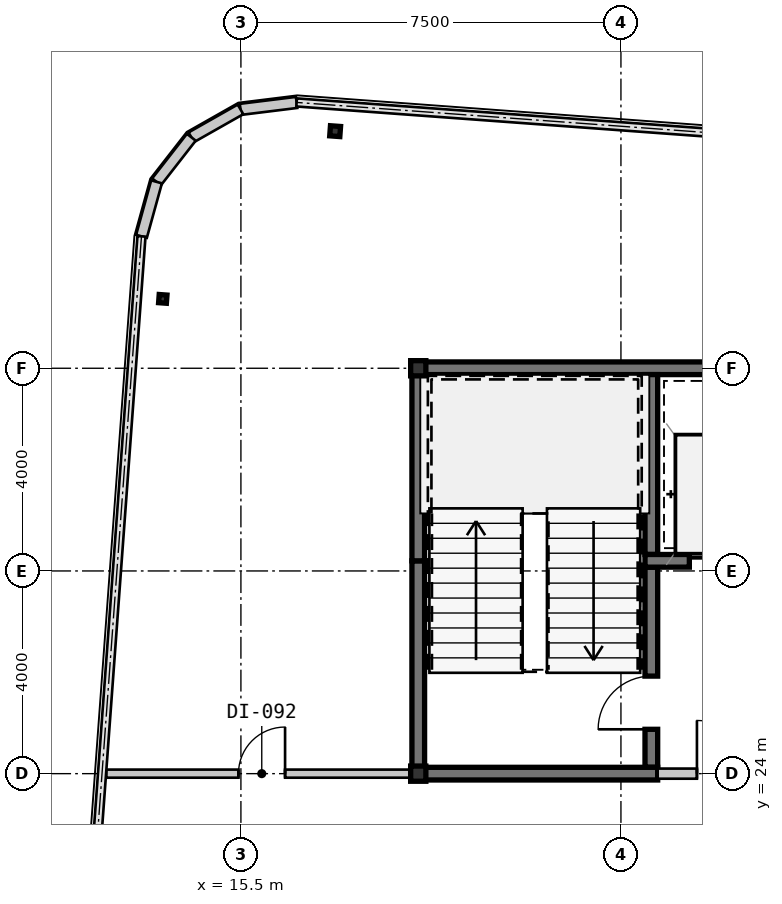
"""IFC4 building model, lengths in metres.
Left out: names, types, materials, properties, quantities, classifications, styles, units other than length and angle.
Written with IfcOpenShell. Run it as: python <this file> out.ifc"""

import sys

from ifc_helpers import new_model, si_unit, direction, frame, frame_2d, origin, origin_2d, place, context, subcontext, project, spatial, rectangle, hollow_rectangle, i_section, extrude, source, transform, mapped, element, fill, save


model = new_model("IFC4")
c1 = context("Model", 3, precision=1e-05, world=origin(), true_north=direction((0.0, 1.0)))
c2 = subcontext(c1, "Body", "Model", "MODEL_VIEW")
j1 = project(units=[si_unit("LENGTHUNIT", "METRE"), si_unit("PLANEANGLEUNIT", "RADIAN")], contexts=[c1])
p1 = place(None, origin())
s1 = spatial("IfcSite", under=j1, at=p1, CompositionType="ELEMENT")
p2 = place(p1, origin())
s2 = spatial("IfcBuilding", under=s1, at=p2, CompositionType="ELEMENT")
p3 = place(p2, frame((0.0, 0.0, 239.75)))
s3 = spatial("IfcBuildingStorey", under=s2, at=p3, CompositionType="ELEMENT", Elevation=239.75)
m1 = source(origin(), c2, "Body", "SweptSolid", [
    extrude(hollow_rectangle(XDim=0.3, YDim=0.3, WallThickness=0.012, at=origin_2d()), origin(), (0.0, 0.0, 1.0), 3.15),
])
for number, where, z_axis, x_axis in (
    (1, (19.0, 24.0, 0.0), (0.0, 0.0, 1.0), (1.0, 0.0, 0.0)),
    (2, (19.0, 32.0, 0.0), (0.0, 0.0, 1.0), (1.0, 0.0, 0.0)),
):
    element("IfcColumn", number, at=place(p3, frame(where, z_axis=z_axis, x_axis=x_axis)), inside=s3, PredefinedType="COLUMN", context=c2, shape_type="MappedRepresentation", body=[
        mapped(m1, transform((0.0, 0.0, 0.0), scale=1.0)),
    ])
m2 = source(origin(), c2, "Body", "SweptSolid", [
    extrude(hollow_rectangle(XDim=0.2, YDim=0.2, WallThickness=0.009, at=origin_2d()), origin(), (0.0, 0.0, 1.0), 3.15),
])
p4 = place(p3, frame((17.36, 36.679, 0.0), z_axis=(0.0, 0.0, 1.0), x_axis=(0.997314477224, -0.073238197128, 0.0)))
e3 = element("IfcColumn", 3, at=p4, inside=s3, PredefinedType="COLUMN", context=c2, shape_type="MappedRepresentation", body=[
    mapped(m2, transform((0.0, 0.0, 0.0), scale=1.0)),
])
m3 = source(origin(), c2, "Body", "SweptSolid", [
    extrude(i_section(OverallWidth=0.154, OverallDepth=0.162, WebThickness=0.008, FlangeThickness=0.011, at=origin_2d()), origin(), (0.0, 0.0, 1.0), 3.15),
])
p5 = place(p3, frame((13.958, 33.369, 0.0), z_axis=(0.0, 0.0, 1.0), x_axis=(0.997314477224, -0.073238197128, 0.0)))
e4 = element("IfcColumn", 4, at=p5, inside=s3, PredefinedType="COLUMN", context=c2, shape_type="MappedRepresentation", body=[
    mapped(m3, transform((0.0, 0.0, 0.0), scale=1.0)),
])
m4 = source(origin(), c2, "Body", "SweptSolid", [
    extrude(rectangle(XDim=1.116, YDim=0.22, at=frame_2d((0.558, 0.0))), origin(), (0.0, 0.0, 1.0), 2.93),
])
p6 = place(p3, frame((16.599, 37.246, 0.0), z_axis=(0.0, 0.0, 1.0), x_axis=(-0.992441899189, -0.122715429897, 0.0)))
e5 = element("IfcWall", 5, at=p6, inside=s3, PredefinedType="SOLIDWALL", context=c2, shape_type="MappedRepresentation", body=[
    mapped(m4, transform((0.0, 0.0, 0.0), scale=1.0)),
])
m5 = source(origin(), c2, "Body", "SweptSolid", [
    extrude(rectangle(XDim=1.116, YDim=0.22, at=frame_2d((0.558, 0.0))), origin(), (0.0, 0.0, 1.0), 2.93),
])
p7 = place(p3, frame((15.492, 37.109, 0.0), z_axis=(0.0, 0.0, 1.0), x_axis=(-0.869934579941, -0.493167138628, 0.0)))
e6 = element("IfcWall", 6, at=p7, inside=s3, PredefinedType="SOLIDWALL", context=c2, shape_type="MappedRepresentation", body=[
    mapped(m5, transform((0.0, 0.0, 0.0), scale=1.0)),
])
m6 = source(origin(), c2, "Body", "SweptSolid", [
    extrude(rectangle(XDim=1.116, YDim=0.22, at=frame_2d((0.558, 0.0))), origin(), (0.0, 0.0, 1.0), 2.93),
])
p8 = place(p3, frame((14.521, 36.559, 0.0), z_axis=(0.0, 0.0, 1.0), x_axis=(-0.614909386406, -0.788597772321, 0.0)))
e7 = element("IfcWall", 7, at=p8, inside=s3, PredefinedType="SOLIDWALL", context=c2, shape_type="MappedRepresentation", body=[
    mapped(m6, transform((0.0, 0.0, 0.0), scale=1.0)),
])
p9 = place(p3, frame((13.835, 35.679, 0.0), z_axis=(0.0, 0.0, 1.0), x_axis=(-0.266300605026, -0.963890028874, 0.0)))
e8 = element("IfcWall", 8, at=p9, inside=s3, PredefinedType="SOLIDWALL", context=c2, shape_type="MappedRepresentation", body=[
    mapped(m5, transform((0.0, 0.0, 0.0), scale=1.0)),
])
m7 = source(origin(), c2, "Body", "SweptSolid", [
    extrude(rectangle(XDim=9.125, YDim=0.25, at=frame_2d((4.562, 0.0))), origin(), (0.0, 0.0, 1.0), 2.93),
])
p10 = place(p3, frame((18.875, 32.0, 0.0), z_axis=(0.0, 0.0, 1.0), x_axis=(1.0, 0.0, 0.0)))
e9 = element("IfcWall", 9, at=p10, inside=s3, PredefinedType="SHEAR", context=c2, shape_type="MappedRepresentation", body=[
    mapped(m7, transform((0.0, 0.0, 0.0), scale=1.0)),
])
m8 = source(origin(), c2, "Body", "SweptSolid", [
    extrude(rectangle(XDim=4.075, YDim=0.25, at=frame_2d((2.038, 0.0))), origin(), (0.0, 0.0, 1.0), 2.93),
])
p11 = place(p3, frame((19.0, 24.125, 0.0), z_axis=(0.0, 0.0, 1.0), x_axis=(0.0, 1.0, 0.0)))
e10 = element("IfcWall", 10, at=p11, inside=s3, PredefinedType="SHEAR", context=c2, shape_type="MappedRepresentation", body=[
    mapped(m8, transform((0.0, 0.0, 0.0), scale=1.0)),
])
m9 = source(origin(), c2, "Body", "SweptSolid", [
    extrude(rectangle(XDim=3.675, YDim=0.25, at=frame_2d((1.837, 0.0))), origin(), (0.0, 0.0, 1.0), 2.93),
])
p12 = place(p3, frame((19.0, 28.2, 0.0), z_axis=(0.0, 0.0, 1.0), x_axis=(0.0, 1.0, 0.0)))
e11 = element("IfcWall", 11, at=p12, inside=s3, PredefinedType="SHEAR", context=c2, shape_type="MappedRepresentation", body=[
    mapped(m9, transform((0.0, 0.0, 0.0), scale=1.0)),
])
m10 = source(origin(), c2, "Body", "SweptSolid", [
    extrude(rectangle(XDim=3.55, YDim=0.25, at=frame_2d((1.775, 0.0))), origin(), (0.0, 0.0, 1.0), 2.93),
])
p13 = place(p3, frame((23.6, 28.325, 0.0), z_axis=(0.0, 0.0, 1.0), x_axis=(0.0, 1.0, 0.0)))
e12 = element("IfcWall", 12, at=p13, inside=s3, PredefinedType="SHEAR", context=c2, shape_type="MappedRepresentation", body=[
    mapped(m10, transform((0.0, 0.0, 0.0), scale=1.0)),
])
m11 = source(origin(), c2, "Body", "SweptSolid", [
    extrude(rectangle(XDim=3.95, YDim=0.25, at=frame_2d((1.975, 0.0))), origin(), (0.0, 0.0, 1.0), 2.93),
])
p14 = place(p3, frame((23.6, 24.125, 0.0), z_axis=(0.0, 0.0, 1.0), x_axis=(0.0, 1.0, 0.0)))
e13 = element("IfcWall", 13, at=p14, inside=s3, PredefinedType="SHEAR", context=c2, shape_type="MappedRepresentation", body=[
    mapped(m11, transform((0.0, 0.0, 0.0), scale=1.0)),
])
m12 = source(origin(), c2, "Body", "SweptSolid", [
    extrude(rectangle(XDim=1.05, YDim=2.1, at=frame_2d((0.525, 1.05))), frame((0.0, 0.135, 0.0), z_axis=(0.0, -1.0, 0.0), x_axis=(1.0, 0.0, 0.0)), (0.0, 0.0, 1.0), 0.27),
])
p15 = place(p14, frame((0.75, 0.0, 0.0)))
e14 = element("IfcOpeningElement", 14, at=p15, cuts=e13, PredefinedType="OPENING", context=c2, shape_type="MappedRepresentation", body=[
    mapped(m12, transform((0.0, 0.0, 0.0), scale=1.0)),
])
m13 = source(origin(), c2, "Body", "SweptSolid", [
    extrude(rectangle(XDim=4.85, YDim=0.25, at=frame_2d((2.425, 0.0))), origin(), (0.0, 0.0, 1.0), 2.93),
])
p16 = place(p3, frame((18.875, 24.0, 0.0), z_axis=(0.0, 0.0, 1.0), x_axis=(1.0, 0.0, 0.0)))
e15 = element("IfcWall", 15, at=p16, inside=s3, PredefinedType="SHEAR", context=c2, shape_type="MappedRepresentation", body=[
    mapped(m13, transform((0.0, 0.0, 0.0), scale=1.0)),
])
m14 = source(origin(), c2, "Body", "SweptSolid", [
    extrude(rectangle(XDim=2.85, YDim=0.25, at=frame_2d((1.425, 0.0))), origin(), (0.0, 0.0, 1.0), 2.93),
])
p17 = place(p3, frame((23.475, 28.2, 0.0), z_axis=(0.0, 0.0, 1.0), x_axis=(1.0, 0.0, 0.0)))
e16 = element("IfcWall", 16, at=p17, inside=s3, PredefinedType="SHEAR", context=c2, shape_type="MappedRepresentation", body=[
    mapped(m14, transform((0.0, 0.0, 0.0), scale=1.0)),
])
m15 = source(origin(), c2, "Body", "SweptSolid", [
    extrude(rectangle(XDim=1.1, YDim=2.15, at=frame_2d((0.55, 1.075))), frame((0.0, 0.135, 0.0), z_axis=(0.0, -1.0, 0.0), x_axis=(1.0, 0.0, 0.0)), (0.0, 0.0, 1.0), 0.27),
])
p18 = place(p17, frame((0.875, 0.0, 0.0)))
e17 = element("IfcOpeningElement", 17, at=p18, cuts=e16, PredefinedType="OPENING", context=c2, shape_type="MappedRepresentation", body=[
    mapped(m15, transform((0.0, 0.0, 0.0), scale=1.0)),
])
m16 = source(origin(), c2, "Body", "SweptSolid", [
    extrude(rectangle(XDim=2.725, YDim=0.2, at=frame_2d((1.362, 0.0))), origin(), (0.0, 0.0, 1.0), 2.47),
])
p19 = place(p3, frame((23.725, 24.0, 0.0), z_axis=(0.0, 0.0, 1.0), x_axis=(1.0, 0.0, 0.0)))
e18 = element("IfcWall", 18, at=p19, inside=s3, PredefinedType="SOLIDWALL", context=c2, shape_type="MappedRepresentation", body=[
    mapped(m16, transform((0.0, 0.0, 0.0), scale=1.0)),
])
m17 = source(origin(), c2, "Body", "SweptSolid", [
    extrude(rectangle(XDim=1.05, YDim=2.1, at=frame_2d((0.525, 1.05))), frame((0.0, 0.11, 0.0), z_axis=(0.0, -1.0, 0.0), x_axis=(1.0, 0.0, 0.0)), (0.0, 0.0, 1.0), 0.22),
])
p20 = place(p19, frame((0.775, 0.0, 0.0)))
e19 = element("IfcOpeningElement", 19, at=p20, cuts=e18, PredefinedType="OPENING", context=c2, shape_type="MappedRepresentation", body=[
    mapped(m17, transform((0.0, 0.0, 0.0), scale=1.0)),
])
m18 = source(origin(), c2, "Body", "SweptSolid", [
    extrude(rectangle(XDim=6.032, YDim=0.16, at=frame_2d((3.016, 0.0))), origin(), (0.0, 0.0, 1.0), 2.93),
])
p21 = place(p3, frame((12.843, 24.0, 0.0), z_axis=(0.0, 0.0, 1.0), x_axis=(1.0, 0.0, 0.0)))
e20 = element("IfcWall", 20, at=p21, inside=s3, PredefinedType="PARTITIONING", context=c2, shape_type="MappedRepresentation", body=[
    mapped(m18, transform((0.0, 0.0, 0.0), scale=1.0)),
])
m19 = source(origin(), c2, "Body", "SweptSolid", [
    extrude(rectangle(XDim=0.92, YDim=2.1, at=frame_2d((0.46, 1.05))), frame((0.0, 0.09, 0.0), z_axis=(0.0, -1.0, 0.0), x_axis=(1.0, 0.0, 0.0)), (0.0, 0.0, 1.0), 0.18),
])
p22 = place(p21, frame((2.608, 0.0, 0.0)))
e21 = element("IfcOpeningElement", 21, at=p22, cuts=e20, PredefinedType="OPENING", context=c2, shape_type="MappedRepresentation", body=[
    mapped(m19, transform((0.0, 0.0, 0.0), scale=1.0)),
])
m20 = source(origin(), c2, "Body", "SweptSolid", [
    extrude(rectangle(XDim=1.05, YDim=2.1, at=frame_2d((0.525, 1.05))), frame((0.0, 0.025, 0.0), z_axis=(0.0, -1.0, 0.0), x_axis=(1.0, 0.0, 0.0)), (0.0, 0.0, 1.0), 0.05),
])
p23 = place(p15, origin())
e22 = element("IfcDoor", 22, at=p23, inside=s3, OperationType="SINGLE_SWING_LEFT", PredefinedType="DOOR", context=c2, shape_type="MappedRepresentation", body=[
    mapped(m20, transform((0.0, 0.0, 0.0), scale=1.0)),
])
fill(e14, e22)
m21 = source(origin(), c2, "Body", "SweptSolid", [
    extrude(rectangle(XDim=1.1, YDim=2.15, at=frame_2d((0.55, 1.075))), frame((0.0, 0.025, 0.0), z_axis=(0.0, -1.0, 0.0), x_axis=(1.0, 0.0, 0.0)), (0.0, 0.0, 1.0), 0.05),
])
p24 = place(p18, origin())
e23 = element("IfcDoor", 23, at=p24, inside=s3, OperationType="SLIDING_TO_LEFT", PredefinedType="DOOR", context=c2, shape_type="MappedRepresentation", body=[
    mapped(m21, transform((0.0, 0.0, 0.0), scale=1.0)),
])
fill(e17, e23)
p25 = place(p20, origin())
e24 = element("IfcDoor", 24, at=p25, inside=s3, OperationType="SINGLE_SWING_LEFT", PredefinedType="DOOR", context=c2, shape_type="MappedRepresentation", body=[
    mapped(m20, transform((0.0, 0.0, 0.0), scale=1.0)),
])
fill(e19, e24)
m22 = source(origin(), c2, "Body", "SweptSolid", [
    extrude(rectangle(XDim=0.92, YDim=2.1, at=frame_2d((0.46, 1.05))), frame((0.0, 0.025, 0.0), z_axis=(0.0, -1.0, 0.0), x_axis=(1.0, 0.0, 0.0)), (0.0, 0.0, 1.0), 0.05),
])
p26 = place(p22, origin())
e25 = element("IfcDoor", 25, at=p26, inside=s3, OperationType="SINGLE_SWING_RIGHT", PredefinedType="DOOR", context=c2, shape_type="MappedRepresentation", body=[
    mapped(m22, transform((0.0, 0.0, 0.0), scale=1.0)),
])
fill(e21, e25)
save(model, sys.argv[1])
